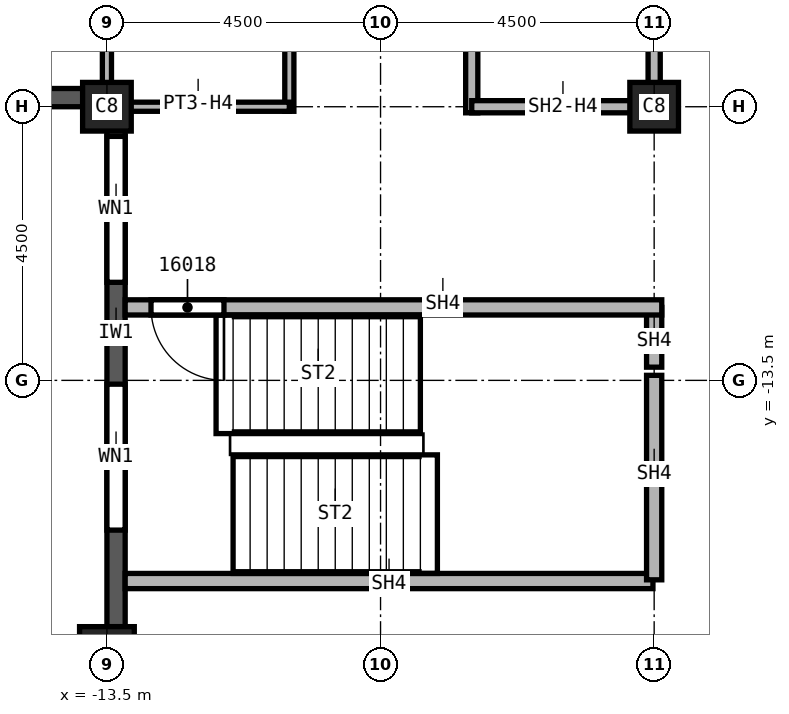
"""IFC4 building model, lengths in metres.
Left out: names, types, materials, properties, quantities, classifications, styles, units other than length and angle.
Written with IfcOpenShell. Run it as: python <this file> out.ifc"""

import sys

from ifc_helpers import new_model, si_unit, direction, frame, frame_2d, origin, origin_2d, place, context, subcontext, project, spatial, rectangle, extrude, element, fill, save


model = new_model("IFC4")
c1 = context("Model", 3, precision=1e-05, world=origin(), true_north=direction((0.0, 1.0)))
c2 = subcontext(c1, "Body", "Model", "MODEL_VIEW")
j1 = project(units=[si_unit("LENGTHUNIT", "METRE"), si_unit("PLANEANGLEUNIT", "RADIAN")], contexts=[c1])
p1 = place(None, origin())
s1 = spatial("IfcSite", under=j1, at=p1, CompositionType="ELEMENT")
p2 = place(p1, origin())
s2 = spatial("IfcBuilding", under=s1, at=p2, CompositionType="ELEMENT")
p3 = place(p2, frame((0.0, 0.0, 242.0)))
s3 = spatial("IfcBuildingStorey", under=s2, at=p3, CompositionType="ELEMENT", Elevation=242.0)
p4 = place(p3, frame((-13.5, -18.0, 0.0), z_axis=(0.0, 0.0, 1.0), x_axis=(1.0, 0.0, 0.0)))
e1 = element("IfcColumn", 1, at=p4, inside=s3, PredefinedType="COLUMN", context=c2, shape_type="SweptSolid", body=[
    extrude(rectangle(XDim=0.9, YDim=0.9, at=origin_2d()), origin(), (0.0, 0.0, 1.0), 3.72),
])
for number, where, z_axis, x_axis in (
    (2, (-4.5, -9.0, 0.0), (0.0, 0.0, 1.0), (1.0, 0.0, 0.0)),
    (3, (-13.5, -9.0, 0.0), (0.0, 0.0, 1.0), (1.0, 0.0, 0.0)),
):
    element("IfcColumn", number, at=place(p3, frame(where, z_axis=z_axis, x_axis=x_axis)), inside=s3, PredefinedType="COLUMN", context=c2, shape_type="SweptSolid", body=[
        extrude(rectangle(XDim=0.8, YDim=0.8, at=origin_2d()), origin(), (0.0, 0.0, 1.0), 3.72),
    ])
p5 = place(p3, frame((-13.35, -9.025, 0.0), z_axis=(0.0, 0.0, 1.0), x_axis=(0.0, -1.0, 0.0)))
e4 = element("IfcWall", 4, at=p5, inside=s3, PredefinedType="SOLIDWALL", context=c2, shape_type="SweptSolid", body=[
    extrude(rectangle(XDim=8.525, YDim=0.3, at=frame_2d((4.263, 0.0))), origin(), (0.0, 0.0, 1.0), 3.12),
])
p6 = place(p5, frame((0.462, 0.0, 0.8)))
e5 = element("IfcOpeningElement", 5, at=p6, cuts=e4, PredefinedType="OPENING", context=c2, shape_type="SweptSolid", body=[
    extrude(rectangle(XDim=2.4, YDim=1.95, at=frame_2d((1.2, 0.975))), frame((0.0, 0.15, 0.0), z_axis=(0.0, -1.0, 0.0), x_axis=(1.0, 0.0, 0.0)), (0.0, 0.0, 1.0), 0.3),
])
p7 = place(p5, frame((4.538, 0.0, 0.8)))
e6 = element("IfcOpeningElement", 6, at=p7, cuts=e4, PredefinedType="OPENING", context=c2, shape_type="SweptSolid", body=[
    extrude(rectangle(XDim=2.4, YDim=1.95, at=frame_2d((1.2, 0.975))), frame((0.0, 0.15, 0.0), z_axis=(0.0, -1.0, 0.0), x_axis=(1.0, 0.0, 0.0)), (0.0, 0.0, 1.0), 0.3),
])
p8 = place(p3, frame((-22.05, -8.85, 0.0), z_axis=(0.0, 0.0, 1.0), x_axis=(1.0, 0.0, 0.0)))
e7 = element("IfcWall", 7, at=p8, inside=s3, PredefinedType="SOLIDWALL", context=c2, shape_type="SweptSolid", body=[
    extrude(rectangle(XDim=8.525, YDim=0.3, at=frame_2d((4.263, 0.0))), origin(), (0.0, 0.0, 1.0), 3.12),
])
p9 = place(p8, frame((4.913, 0.0, 0.8)))
e8 = element("IfcOpeningElement", 8, at=p9, cuts=e7, PredefinedType="OPENING", context=c2, shape_type="SweptSolid", body=[
    extrude(rectangle(XDim=2.4, YDim=1.95, at=frame_2d((1.2, 0.975))), frame((0.0, 0.15, 0.0), z_axis=(0.0, -1.0, 0.0), x_axis=(1.0, 0.0, 0.0)), (0.0, 0.0, 1.0), 0.3),
])
p10 = place(p8, frame((0.894, 0.0, 0.8)))
e9 = element("IfcOpeningElement", 9, at=p10, cuts=e7, PredefinedType="OPENING", context=c2, shape_type="SweptSolid", body=[
    extrude(rectangle(XDim=1.0, YDim=1.95, at=frame_2d((0.5, 0.975))), frame((0.0, 0.15, 0.0), z_axis=(0.0, -1.0, 0.0), x_axis=(1.0, 0.0, 0.0)), (0.0, 0.0, 1.0), 0.3),
])
p11 = place(p8, frame((2.494, 0.0, 0.8)))
e10 = element("IfcOpeningElement", 10, at=p11, cuts=e7, PredefinedType="OPENING", context=c2, shape_type="SweptSolid", body=[
    extrude(rectangle(XDim=0.6, YDim=1.95, at=frame_2d((0.3, 0.975))), frame((0.0, 0.15, 0.0), z_axis=(0.0, -1.0, 0.0), x_axis=(1.0, 0.0, 0.0)), (0.0, 0.0, 1.0), 0.3),
])
p12 = place(p3, frame((-7.5, -9.1, 0.0), z_axis=(0.0, 0.0, 1.0), x_axis=(0.0, 1.0, 0.0)))
e11 = element("IfcWall", 11, at=p12, inside=s3, PredefinedType="SOLIDWALL", context=c2, shape_type="SweptSolid", body=[
    extrude(rectangle(XDim=6.225, YDim=0.2, at=frame_2d((3.113, 0.0))), origin(), (0.0, 0.0, 1.0), 3.72),
])
p13 = place(p3, frame((-4.5, -9.0, 0.0), z_axis=(0.0, 0.0, 1.0), x_axis=(-1.0, 0.0, 0.0)))
e12 = element("IfcWall", 12, at=p13, inside=s3, PredefinedType="SOLIDWALL", context=c2, shape_type="SweptSolid", body=[
    extrude(rectangle(XDim=3.0, YDim=0.2, at=frame_2d((1.5, 0.0))), origin(), (0.0, 0.0, 1.0), 3.042),
])
p14 = place(p3, frame((-4.5, 0.0, 0.0), z_axis=(0.0, 0.0, 1.0), x_axis=(0.0, -1.0, 0.0)))
e13 = element("IfcWall", 13, at=p14, inside=s3, PredefinedType="SOLIDWALL", context=c2, shape_type="SweptSolid", body=[
    extrude(rectangle(XDim=9.1, YDim=0.2, at=frame_2d((4.55, 0.0))), origin(), (0.0, 0.0, 1.0), 3.042),
])
p15 = place(p14, frame((6.25, 0.0, 0.0)))
e14 = element("IfcOpeningElement", 14, at=p15, cuts=e13, PredefinedType="OPENING", context=c2, shape_type="SweptSolid", body=[
    extrude(rectangle(XDim=1.1, YDim=2.1, at=frame_2d((0.55, 1.05))), frame((0.0, 0.1, 0.0), z_axis=(0.0, -1.0, 0.0), x_axis=(1.0, 0.0, 0.0)), (0.0, 0.0, 1.0), 0.2),
])
p16 = place(p14, frame((4.6, 0.0, 0.0)))
e15 = element("IfcOpeningElement", 15, at=p16, cuts=e13, PredefinedType="OPENING", context=c2, shape_type="SweptSolid", body=[
    extrude(rectangle(XDim=1.1, YDim=2.1, at=frame_2d((0.55, 1.05))), frame((0.0, 0.1, 0.0), z_axis=(0.0, -1.0, 0.0), x_axis=(1.0, 0.0, 0.0)), (0.0, 0.0, 1.0), 0.2),
])
p17 = place(p3, frame((-4.52, -16.8, 0.0), z_axis=(0.0, 0.0, 1.0), x_axis=(-1.0, 0.0, 0.0)))
e16 = element("IfcWall", 16, at=p17, inside=s3, PredefinedType="SOLIDWALL", context=c2, shape_type="SweptSolid", body=[
    extrude(rectangle(XDim=8.68, YDim=0.25, at=frame_2d((4.34, 0.0))), origin(), (0.0, 0.0, 1.0), 3.72),
])
p18 = place(p3, frame((-4.5, -13.417, 0.0), z_axis=(0.0, 0.0, 1.0), x_axis=(0.0, -1.0, 0.0)))
e17 = element("IfcWall", 17, at=p18, inside=s3, PredefinedType="SOLIDWALL", context=c2, shape_type="SweptSolid", body=[
    extrude(rectangle(XDim=3.363, YDim=0.25, at=frame_2d((1.682, 0.0))), origin(), (0.0, 0.0, 1.0), 3.72),
])
p19 = place(p3, frame((-4.5, -12.3, 0.0), z_axis=(0.0, 0.0, 1.0), x_axis=(0.0, -1.0, 0.0)))
e18 = element("IfcWall", 18, at=p19, inside=s3, PredefinedType="SOLIDWALL", context=c2, shape_type="SweptSolid", body=[
    extrude(rectangle(XDim=0.983, YDim=0.25, at=frame_2d((0.491, 0.0))), origin(), (0.0, 0.0, 1.0), 3.72),
])
p20 = place(p3, frame((-4.375, -12.3, 0.0), z_axis=(0.0, 0.0, 1.0), x_axis=(-1.0, 0.0, 0.0)))
e19 = element("IfcWall", 19, at=p20, inside=s3, PredefinedType="SOLIDWALL", context=c2, shape_type="SweptSolid", body=[
    extrude(rectangle(XDim=8.825, YDim=0.25, at=frame_2d((4.413, 0.0))), origin(), (0.0, 0.0, 1.0), 3.72),
])
p21 = place(p20, frame((7.2, 0.0, 0.0)))
e20 = element("IfcOpeningElement", 20, at=p21, cuts=e19, PredefinedType="OPENING", context=c2, shape_type="SweptSolid", body=[
    extrude(rectangle(XDim=1.2, YDim=2.1, at=frame_2d((0.6, 1.05))), frame((0.0, 0.125, 0.0), z_axis=(0.0, -1.0, 0.0), x_axis=(1.0, 0.0, 0.0)), (0.0, 0.0, 1.0), 0.25),
])
p22 = place(p3, frame((-13.5, -9.0, 0.0), z_axis=(0.0, 0.0, 1.0), x_axis=(0.0, 1.0, 0.0)))
e21 = element("IfcWall", 21, at=p22, inside=s3, PredefinedType="PARTITIONING", context=c2, shape_type="SweptSolid", body=[
    extrude(rectangle(XDim=4.0, YDim=0.15, at=frame_2d((2.0, 0.0))), origin(), (0.0, 0.0, 1.0), 3.042),
])
p23 = place(p3, frame((-10.5, -9.075, 0.0), z_axis=(0.0, 0.0, 1.0), x_axis=(0.0, 1.0, 0.0)))
e22 = element("IfcWall", 22, at=p23, inside=s3, PredefinedType="PARTITIONING", context=c2, shape_type="SweptSolid", body=[
    extrude(rectangle(XDim=4.15, YDim=0.15, at=frame_2d((2.075, 0.0))), origin(), (0.0, 0.0, 1.0), 3.72),
])
p24 = place(p23, frame((2.5, 0.0, 0.0)))
e23 = element("IfcOpeningElement", 23, at=p24, cuts=e22, PredefinedType="OPENING", context=c2, shape_type="SweptSolid", body=[
    extrude(rectangle(XDim=0.9, YDim=2.1, at=frame_2d((0.45, 1.05))), frame((0.0, 0.075, 0.0), z_axis=(0.0, -1.0, 0.0), x_axis=(1.0, 0.0, 0.0)), (0.0, 0.0, 1.0), 0.15),
])
p25 = place(p3, frame((-10.5, -9.0, 0.0), z_axis=(0.0, 0.0, 1.0), x_axis=(-1.0, 0.0, 0.0)))
e24 = element("IfcWall", 24, at=p25, inside=s3, PredefinedType="PARTITIONING", context=c2, shape_type="SweptSolid", body=[
    extrude(rectangle(XDim=3.025, YDim=0.15, at=frame_2d((1.512, 0.0))), origin(), (0.0, 0.0, 1.0), 3.042),
])
p26 = place(p6, origin())
e25 = element("IfcWindow", 25, at=p26, inside=s3, PartitioningType="SINGLE_PANEL", PredefinedType="WINDOW", context=c2, shape_type="SweptSolid", body=[
    extrude(rectangle(XDim=2.4, YDim=1.95, at=frame_2d((1.2, 0.975))), frame((0.0, 0.03, 0.0), z_axis=(0.0, -1.0, 0.0), x_axis=(1.0, 0.0, 0.0)), (0.0, 0.0, 1.0), 0.06),
])
fill(e5, e25)
p27 = place(p7, origin())
e26 = element("IfcWindow", 26, at=p27, inside=s3, PartitioningType="SINGLE_PANEL", PredefinedType="WINDOW", context=c2, shape_type="SweptSolid", body=[
    extrude(rectangle(XDim=2.4, YDim=1.95, at=frame_2d((1.2, 0.975))), frame((0.0, 0.03, 0.0), z_axis=(0.0, -1.0, 0.0), x_axis=(1.0, 0.0, 0.0)), (0.0, 0.0, 1.0), 0.06),
])
fill(e6, e26)
p28 = place(p21, origin())
e27 = element("IfcDoor", 27, at=p28, inside=s3, OperationType="SINGLE_SWING_LEFT", PredefinedType="DOOR", context=c2, shape_type="SweptSolid", body=[
    extrude(rectangle(XDim=1.2, YDim=2.1, at=frame_2d((0.6, 1.05))), frame((0.0, 0.025, 0.0), z_axis=(0.0, -1.0, 0.0), x_axis=(1.0, 0.0, 0.0)), (0.0, 0.0, 1.0), 0.05),
])
fill(e20, e27)
save(model, sys.argv[1])
